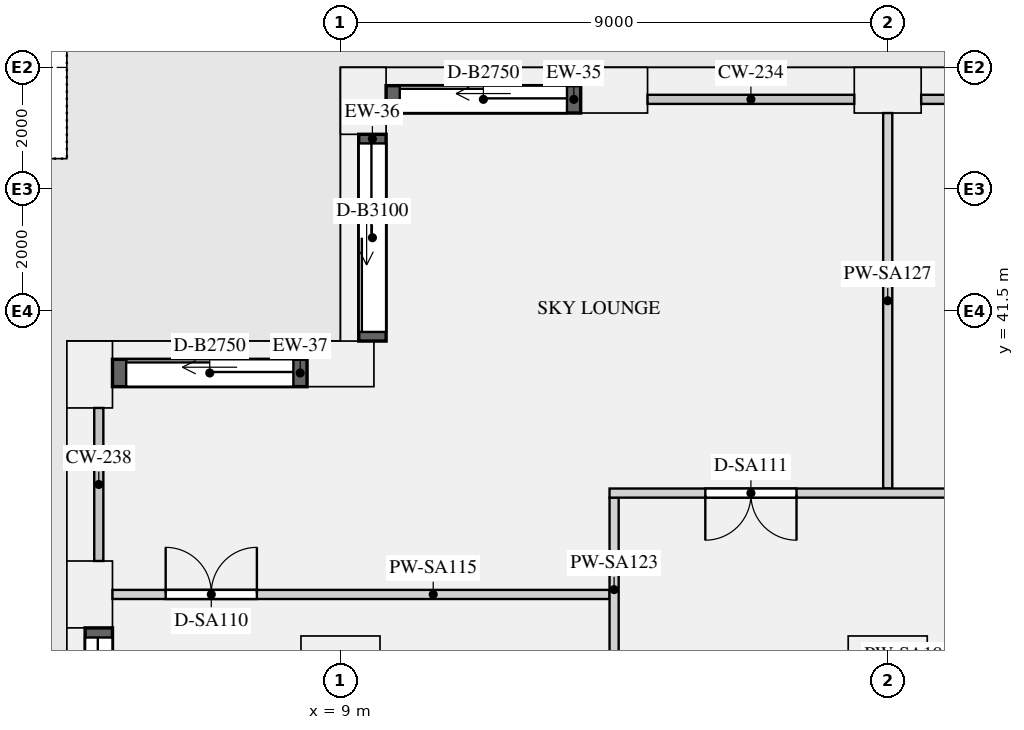
"""IFC4 building model, lengths in metres.
Left out: names, types, materials, properties, quantities, classifications, styles, units other than length and angle.
Written with IfcOpenShell. Run it as: python <this file> out.ifc"""

import sys

from ifc_helpers import new_model, si_unit, direction, frame, frame_2d, origin, origin_2d, place, context, subcontext, project, spatial, rectangle, extrude, element, fill, save


model = new_model("IFC4")
c1 = context("Model", 3, precision=1e-05, world=origin(), true_north=direction((0.0, 1.0)))
c2 = subcontext(c1, "Body", "Model", "MODEL_VIEW")
j1 = project(units=[si_unit("LENGTHUNIT", "METRE"), si_unit("PLANEANGLEUNIT", "RADIAN")], contexts=[c1])
p1 = place(None, origin())
s1 = spatial("IfcSite", under=j1, at=p1, CompositionType="ELEMENT")
p2 = place(p1, origin())
s2 = spatial("IfcBuilding", under=s1, at=p2, CompositionType="ELEMENT")
p3 = place(p2, frame((0.0, 0.0, 77.25)))
s3 = spatial("IfcBuildingStorey", under=s2, at=p3, CompositionType="ELEMENT", Elevation=77.25)
for number, where, z_axis, x_axis in (
    (1, (18.0, 45.125, 0.0), (0.0, 0.0, 1.0), (-1.0, 0.0, 0.0)),
    (2, (13.5, 45.125, 0.0), (0.0, 0.0, 1.0), (-1.0, 0.0, 0.0)),
    (3, (9.375, 44.95, 0.0), (0.0, 0.0, 1.0), (0.0, -1.0, 0.0)),
    (4, (9.0, 40.625, 0.0), (0.0, 0.0, 1.0), (-1.0, 0.0, 0.0)),
    (5, (4.875, 40.45, 0.0), (0.0, 0.0, 1.0), (0.0, -1.0, 0.0)),
    (6, (4.875, 36.833, 0.0), (0.0, 0.0, 1.0), (0.0, -1.0, 0.0)),
):
    element("IfcColumn", number, at=place(p3, frame(where, z_axis=z_axis, x_axis=x_axis)), inside=s3, PredefinedType="USERDEFINED", context=c2, shape_type="SweptSolid", body=[
        extrude(rectangle(XDim=1.1, YDim=0.75, at=origin_2d()), origin(), (0.0, 0.0, 1.0), 6.3),
    ])
for number, where, z_axis, x_axis in (
    (7, (9.0, 35.5, 0.0), (0.0, 0.0, 1.0), (1.0, 0.0, 0.0)),
    (8, (18.0, 35.5, 0.0), (0.0, 0.0, 1.0), (1.0, 0.0, 0.0)),
):
    element("IfcColumn", number, at=place(p3, frame(where, z_axis=z_axis, x_axis=x_axis)), inside=s3, PredefinedType="COLUMN", context=c2, shape_type="SweptSolid", body=[
        extrude(rectangle(XDim=1.3, YDim=1.3, at=origin_2d()), origin(), (0.0, 0.0, 1.0), 6.3),
    ])
p4 = place(p3, frame((12.95, 44.975, 0.0), z_axis=(0.0, 0.0, 1.0), x_axis=(-1.0, 0.0, 0.0)))
e9 = element("IfcWall", 9, at=p4, inside=s3, PredefinedType="SOLIDWALL", context=c2, shape_type="SweptSolid", body=[
    extrude(rectangle(XDim=3.2, YDim=0.45, at=frame_2d((1.6, 0.0))), origin(), (0.0, 0.0, 1.0), 5.98),
])
p5 = place(p4, frame((0.225, 0.0, 0.0)))
e10 = element("IfcOpeningElement", 10, at=p5, cuts=e9, PredefinedType="OPENING", context=c2, shape_type="SweptSolid", body=[
    extrude(rectangle(XDim=2.75, YDim=2.3, at=frame_2d((1.375, 1.15))), frame((0.0, 0.235, 0.0), z_axis=(0.0, -1.0, 0.0), x_axis=(1.0, 0.0, 0.0)), (0.0, 0.0, 1.0), 0.47),
])
p6 = place(p3, frame((9.525, 44.4, 0.0), z_axis=(0.0, 0.0, 1.0), x_axis=(0.0, -1.0, 0.0)))
e11 = element("IfcWall", 11, at=p6, inside=s3, PredefinedType="SOLIDWALL", context=c2, shape_type="SweptSolid", body=[
    extrude(rectangle(XDim=3.4, YDim=0.45, at=frame_2d((1.7, 0.0))), origin(), (0.0, 0.0, 1.0), 5.98),
])
p7 = place(p6, frame((0.15, 0.0, 0.0)))
e12 = element("IfcOpeningElement", 12, at=p7, cuts=e11, PredefinedType="OPENING", context=c2, shape_type="SweptSolid", body=[
    extrude(rectangle(XDim=3.1, YDim=2.3, at=frame_2d((1.55, 1.15))), frame((0.0, 0.235, 0.0), z_axis=(0.0, -1.0, 0.0), x_axis=(1.0, 0.0, 0.0)), (0.0, 0.0, 1.0), 0.47),
])
p8 = place(p3, frame((8.45, 40.475, 0.0), z_axis=(0.0, 0.0, 1.0), x_axis=(-1.0, 0.0, 0.0)))
e13 = element("IfcWall", 13, at=p8, inside=s3, PredefinedType="SOLIDWALL", context=c2, shape_type="SweptSolid", body=[
    extrude(rectangle(XDim=3.2, YDim=0.45, at=frame_2d((1.6, 0.0))), origin(), (0.0, 0.0, 1.0), 5.98),
])
p9 = place(p8, frame((0.225, 0.0, 0.0)))
e14 = element("IfcOpeningElement", 14, at=p9, cuts=e13, PredefinedType="OPENING", context=c2, shape_type="SweptSolid", body=[
    extrude(rectangle(XDim=2.75, YDim=2.3, at=frame_2d((1.375, 1.15))), frame((0.0, 0.235, 0.0), z_axis=(0.0, -1.0, 0.0), x_axis=(1.0, 0.0, 0.0)), (0.0, 0.0, 1.0), 0.47),
])
p10 = place(p3, frame((5.025, 36.283, 0.0), z_axis=(0.0, 0.0, 1.0), x_axis=(0.0, -1.0, 0.0)))
e15 = element("IfcWall", 15, at=p10, inside=s3, PredefinedType="SOLIDWALL", context=c2, shape_type="SweptSolid", body=[
    extrude(rectangle(XDim=3.066, YDim=0.45, at=frame_2d((1.533, 0.0))), origin(), (0.0, 0.0, 1.0), 5.98),
])
p11 = place(p10, frame((0.158, 0.0, 0.0)))
e16 = element("IfcOpeningElement", 16, at=p11, cuts=e15, PredefinedType="OPENING", context=c2, shape_type="SweptSolid", body=[
    extrude(rectangle(XDim=2.75, YDim=2.3, at=frame_2d((1.375, 1.15))), frame((0.0, 0.235, 0.0), z_axis=(0.0, -1.0, 0.0), x_axis=(1.0, 0.0, 0.0)), (0.0, 0.0, 1.0), 0.47),
])
p12 = place(p3, frame((13.425, 38.5, 0.0), z_axis=(0.0, 0.0, 1.0), x_axis=(1.0, 0.0, 0.0)))
e17 = element("IfcWall", 17, at=p12, inside=s3, PredefinedType="PARTITIONING", context=c2, shape_type="SweptSolid", body=[
    extrude(rectangle(XDim=58.5, YDim=0.15, at=frame_2d((29.25, 0.0))), origin(), (0.0, 0.0, 1.0), 5.98),
])
p13 = place(p12, frame((1.575, 0.0, 0.0)))
e18 = element("IfcOpeningElement", 18, at=p13, cuts=e17, PredefinedType="OPENING", context=c2, shape_type="SweptSolid", body=[
    extrude(rectangle(XDim=1.5, YDim=2.1, at=frame_2d((0.75, 1.05))), frame((0.0, 0.085, 0.0), z_axis=(0.0, -1.0, 0.0), x_axis=(1.0, 0.0, 0.0)), (0.0, 0.0, 1.0), 0.17),
])
p14 = place(p12, frame((6.825, 0.0, 0.0)))
e19 = element("IfcOpeningElement", 19, at=p14, cuts=e17, PredefinedType="OPENING", context=c2, shape_type="SweptSolid", body=[
    extrude(rectangle(XDim=1.5, YDim=2.1, at=frame_2d((0.75, 1.05))), frame((0.0, 0.085, 0.0), z_axis=(0.0, -1.0, 0.0), x_axis=(1.0, 0.0, 0.0)), (0.0, 0.0, 1.0), 0.17),
])
p15 = place(p12, frame((17.625, 0.0, 0.0)))
e20 = element("IfcOpeningElement", 20, at=p15, cuts=e17, PredefinedType="OPENING", context=c2, shape_type="SweptSolid", body=[
    extrude(rectangle(XDim=0.9, YDim=2.1, at=frame_2d((0.45, 1.05))), frame((0.0, 0.085, 0.0), z_axis=(0.0, -1.0, 0.0), x_axis=(1.0, 0.0, 0.0)), (0.0, 0.0, 1.0), 0.17),
])
p16 = place(p12, frame((24.375, 0.0, 0.0)))
e21 = element("IfcOpeningElement", 21, at=p16, cuts=e17, PredefinedType="OPENING", context=c2, shape_type="SweptSolid", body=[
    extrude(rectangle(XDim=0.9, YDim=2.1, at=frame_2d((0.45, 1.05))), frame((0.0, 0.085, 0.0), z_axis=(0.0, -1.0, 0.0), x_axis=(1.0, 0.0, 0.0)), (0.0, 0.0, 1.0), 0.17),
])
p17 = place(p12, frame((30.375, 0.0, 0.0)))
e22 = element("IfcOpeningElement", 22, at=p17, cuts=e17, PredefinedType="OPENING", context=c2, shape_type="SweptSolid", body=[
    extrude(rectangle(XDim=0.9, YDim=2.1, at=frame_2d((0.45, 1.05))), frame((0.0, 0.085, 0.0), z_axis=(0.0, -1.0, 0.0), x_axis=(1.0, 0.0, 0.0)), (0.0, 0.0, 1.0), 0.17),
])
p18 = place(p12, frame((44.625, 0.0, 0.0)))
e23 = element("IfcOpeningElement", 23, at=p18, cuts=e17, PredefinedType="OPENING", context=c2, shape_type="SweptSolid", body=[
    extrude(rectangle(XDim=0.9, YDim=2.1, at=frame_2d((0.45, 1.05))), frame((0.0, 0.085, 0.0), z_axis=(0.0, -1.0, 0.0), x_axis=(1.0, 0.0, 0.0)), (0.0, 0.0, 1.0), 0.17),
])
p19 = place(p12, frame((53.625, 0.0, 0.0)))
e24 = element("IfcOpeningElement", 24, at=p19, cuts=e17, PredefinedType="OPENING", context=c2, shape_type="SweptSolid", body=[
    extrude(rectangle(XDim=0.9, YDim=2.1, at=frame_2d((0.45, 1.05))), frame((0.0, 0.085, 0.0), z_axis=(0.0, -1.0, 0.0), x_axis=(1.0, 0.0, 0.0)), (0.0, 0.0, 1.0), 0.17),
])
p20 = place(p3, frame((5.25, 36.833, 0.0), z_axis=(0.0, 0.0, 1.0), x_axis=(1.0, 0.0, 0.0)))
e25 = element("IfcWall", 25, at=p20, inside=s3, PredefinedType="PARTITIONING", context=c2, shape_type="SweptSolid", body=[
    extrude(rectangle(XDim=8.175, YDim=0.15, at=frame_2d((4.087, 0.0))), origin(), (0.0, 0.0, 1.0), 5.98),
])
p21 = place(p20, frame((0.875, 0.0, 0.0)))
e26 = element("IfcOpeningElement", 26, at=p21, cuts=e25, PredefinedType="OPENING", context=c2, shape_type="SweptSolid", body=[
    extrude(rectangle(XDim=1.5, YDim=2.1, at=frame_2d((0.75, 1.05))), frame((0.0, 0.085, 0.0), z_axis=(0.0, -1.0, 0.0), x_axis=(1.0, 0.0, 0.0)), (0.0, 0.0, 1.0), 0.17),
])
p22 = place(p3, frame((13.5, 35.4, 0.0), z_axis=(0.0, 0.0, 1.0), x_axis=(0.0, 1.0, 0.0)))
e27 = element("IfcWall", 27, at=p22, inside=s3, PredefinedType="PARTITIONING", context=c2, shape_type="SweptSolid", body=[
    extrude(rectangle(XDim=3.025, YDim=0.15, at=frame_2d((1.513, 0.0))), origin(), (0.0, 0.0, 1.0), 5.98),
])
p23 = place(p3, frame((18.0, 38.575, 0.0), z_axis=(0.0, 0.0, 1.0), x_axis=(0.0, 1.0, 0.0)))
e28 = element("IfcWall", 28, at=p23, inside=s3, PredefinedType="PARTITIONING", context=c2, shape_type="SweptSolid", body=[
    extrude(rectangle(XDim=6.175, YDim=0.15, at=frame_2d((3.087, 0.0))), origin(), (0.0, 0.0, 1.0), 5.98),
])
p24 = place(p5, origin())
e29 = element("IfcDoor", 29, at=p24, inside=s3, OperationType="SLIDING_TO_LEFT", PredefinedType="DOOR", context=c2, shape_type="SweptSolid", body=[
    extrude(rectangle(XDim=2.75, YDim=2.3, at=frame_2d((1.375, 1.15))), frame((0.0, -0.07, 0.0), z_axis=(0.0, -1.0, 0.0), x_axis=(1.0, 0.0, 0.0)), (0.0, 0.0, 1.0), 0.05),
])
fill(e10, e29)
p25 = place(p7, origin())
e30 = element("IfcDoor", 30, at=p25, inside=s3, OperationType="SLIDING_TO_LEFT", PredefinedType="DOOR", context=c2, shape_type="SweptSolid", body=[
    extrude(rectangle(XDim=3.1, YDim=2.3, at=frame_2d((1.55, 1.15))), frame((0.0, -0.07, 0.0), z_axis=(0.0, -1.0, 0.0), x_axis=(1.0, 0.0, 0.0)), (0.0, 0.0, 1.0), 0.05),
])
fill(e12, e30)
p26 = place(p9, origin())
e31 = element("IfcDoor", 31, at=p26, inside=s3, OperationType="SLIDING_TO_LEFT", PredefinedType="DOOR", context=c2, shape_type="SweptSolid", body=[
    extrude(rectangle(XDim=2.75, YDim=2.3, at=frame_2d((1.375, 1.15))), frame((0.0, -0.07, 0.0), z_axis=(0.0, -1.0, 0.0), x_axis=(1.0, 0.0, 0.0)), (0.0, 0.0, 1.0), 0.05),
])
fill(e14, e31)
p27 = place(p11, origin())
e32 = element("IfcDoor", 32, at=p27, inside=s3, OperationType="SLIDING_TO_LEFT", PredefinedType="DOOR", context=c2, shape_type="SweptSolid", body=[
    extrude(rectangle(XDim=2.75, YDim=2.3, at=frame_2d((1.375, 1.15))), frame((0.0, -0.07, 0.0), z_axis=(0.0, -1.0, 0.0), x_axis=(1.0, 0.0, 0.0)), (0.0, 0.0, 1.0), 0.05),
])
fill(e16, e32)
p28 = place(p21, origin())
e33 = element("IfcDoor", 33, at=p28, inside=s3, OperationType="DOUBLE_DOOR_SINGLE_SWING", PredefinedType="DOOR", context=c2, shape_type="SweptSolid", body=[
    extrude(rectangle(XDim=1.5, YDim=2.1, at=frame_2d((0.75, 1.05))), frame((0.0, 0.025, 0.0), z_axis=(0.0, -1.0, 0.0), x_axis=(1.0, 0.0, 0.0)), (0.0, 0.0, 1.0), 0.05),
])
fill(e26, e33)
p29 = place(p13, frame((1.5, 0.0, 0.0), z_axis=(0.0, 0.0, 1.0), x_axis=(-1.0, 0.0, 0.0)))
e34 = element("IfcDoor", 34, at=p29, inside=s3, OperationType="DOUBLE_DOOR_SINGLE_SWING", PredefinedType="DOOR", context=c2, shape_type="SweptSolid", body=[
    extrude(rectangle(XDim=1.5, YDim=2.1, at=frame_2d((0.75, 1.05))), frame((0.0, 0.025, 0.0), z_axis=(0.0, -1.0, 0.0), x_axis=(1.0, 0.0, 0.0)), (0.0, 0.0, 1.0), 0.05),
])
fill(e18, e34)
save(model, sys.argv[1])
